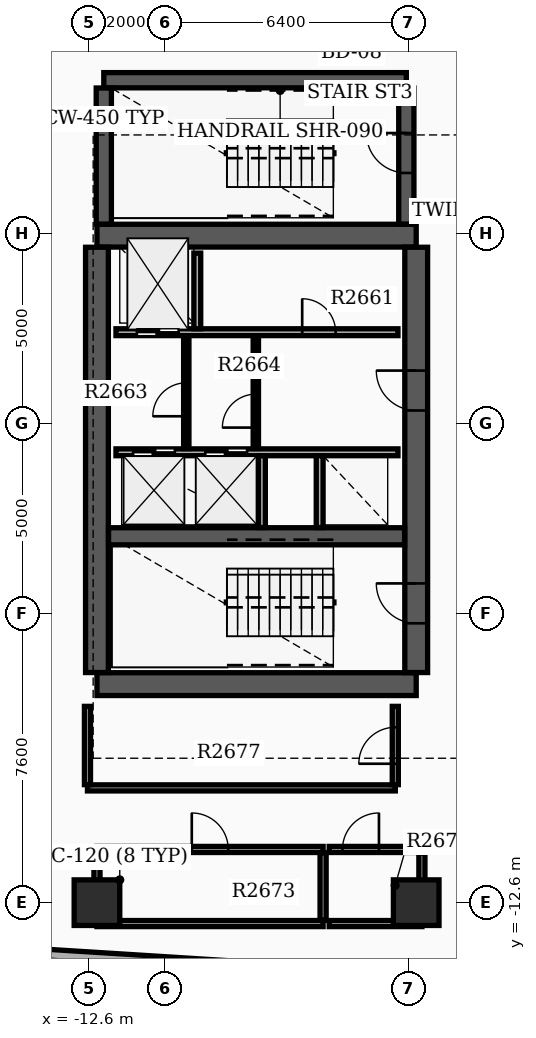
"""IFC4 building model, lengths in metres.
Left out: names, types, materials, properties, quantities, classifications, styles, units other than length and angle.
Written with IfcOpenShell. Run it as: python <this file> out.ifc"""

import sys

from ifc_helpers import new_model, si_unit, direction, frame, frame_2d, origin, origin_2d, place, context, subcontext, project, spatial, rectangle, extrude, element, fill, save


model = new_model("IFC4")
c1 = context("Model", 3, precision=1e-05, world=origin(), true_north=direction((0.0, 1.0)))
c2 = subcontext(c1, "Body", "Model", "MODEL_VIEW")
j1 = project(units=[si_unit("LENGTHUNIT", "METRE"), si_unit("PLANEANGLEUNIT", "RADIAN")], contexts=[c1])
p1 = place(None, origin())
s1 = spatial("IfcSite", under=j1, at=p1, CompositionType="ELEMENT")
p2 = place(p1, origin())
s2 = spatial("IfcBuilding", under=s1, at=p2, CompositionType="ELEMENT")
p3 = place(p2, frame((0.0, 0.0, 168.3)))
s3 = spatial("IfcBuildingStorey", under=s2, at=p3, CompositionType="ELEMENT", Elevation=168.3)
for number, where, z_axis, x_axis in (
    (1, (-12.4, -6.85, 0.0), (0.0, 0.0, 1.0), (1.0, 0.0, 0.0)),
    (2, (-12.4, 4.95, 0.0), (0.0, 0.0, 1.0), (1.0, 0.0, 0.0)),
):
    element("IfcWall", number, at=place(p3, frame(where, z_axis=z_axis, x_axis=x_axis)), inside=s3, PredefinedType="SHEAR", context=c2, shape_type="SweptSolid", body=[
        extrude(rectangle(XDim=8.4, YDim=0.6, at=frame_2d((4.2, 0.0))), origin(), (0.0, 0.0, 1.0), 3.7),
    ])
p4 = place(p3, frame((-12.4, -6.545, 0.0), z_axis=(0.0, 0.0, 1.0), x_axis=(0.0, 1.0, 0.0)))
e3 = element("IfcWall", 3, at=p4, inside=s3, PredefinedType="SHEAR", context=c2, shape_type="SweptSolid", body=[
    extrude(rectangle(XDim=11.19, YDim=0.6, at=frame_2d((5.595, 0.0))), origin(), (0.0, 0.0, 1.0), 3.7),
])
p5 = place(p3, frame((-4.0, -6.545, 0.0), z_axis=(0.0, 0.0, 1.0), x_axis=(0.0, 1.0, 0.0)))
e4 = element("IfcWall", 4, at=p5, inside=s3, PredefinedType="SHEAR", context=c2, shape_type="SweptSolid", body=[
    extrude(rectangle(XDim=11.19, YDim=0.6, at=frame_2d((5.595, 0.0))), origin(), (0.0, 0.0, 1.0), 3.7),
])
p6 = place(p5, frame((1.295, 0.0, 0.0)))
e5 = element("IfcOpeningElement", 5, at=p6, cuts=e4, PredefinedType="OPENING", context=c2, shape_type="SweptSolid", body=[
    extrude(rectangle(XDim=1.05, YDim=2.15, at=frame_2d((0.525, 1.075))), frame((0.0, 0.31, 0.0), z_axis=(0.0, -1.0, 0.0), x_axis=(1.0, 0.0, 0.0)), (0.0, 0.0, 1.0), 0.62),
])
p7 = place(p5, frame((6.895, 0.0, 0.0)))
e6 = element("IfcOpeningElement", 6, at=p7, cuts=e4, PredefinedType="OPENING", context=c2, shape_type="SweptSolid", body=[
    extrude(rectangle(XDim=1.05, YDim=2.15, at=frame_2d((0.525, 1.075))), frame((0.0, 0.31, 0.0), z_axis=(0.0, -1.0, 0.0), x_axis=(1.0, 0.0, 0.0)), (0.0, 0.0, 1.0), 0.62),
])
p8 = place(p3, frame((-12.095, -2.96, 0.0), z_axis=(0.0, 0.0, 1.0), x_axis=(1.0, 0.0, 0.0)))
e7 = element("IfcWall", 7, at=p8, inside=s3, PredefinedType="SHEAR", context=c2, shape_type="SweptSolid", body=[
    extrude(rectangle(XDim=7.79, YDim=0.45, at=frame_2d((3.895, 0.0))), origin(), (0.0, 0.0, 1.0), 3.7),
])
p9 = place(p3, frame((-12.22, 9.04, 0.0), z_axis=(0.0, 0.0, 1.0), x_axis=(1.0, 0.0, 0.0)))
e8 = element("IfcWall", 8, at=p9, inside=s3, PredefinedType="SHEAR", context=c2, shape_type="SweptSolid", body=[
    extrude(rectangle(XDim=7.96, YDim=0.4, at=frame_2d((3.98, 0.0))), origin(), (0.0, 0.0, 1.0), 3.7),
])
p10 = place(p3, frame((-12.22, 5.255, 0.0), z_axis=(0.0, 0.0, 1.0), x_axis=(0.0, 1.0, 0.0)))
e9 = element("IfcWall", 9, at=p10, inside=s3, PredefinedType="SHEAR", context=c2, shape_type="SweptSolid", body=[
    extrude(rectangle(XDim=3.58, YDim=0.4, at=frame_2d((1.79, 0.0))), origin(), (0.0, 0.0, 1.0), 3.7),
])
p11 = place(p3, frame((-4.26, 5.255, 0.0), z_axis=(0.0, 0.0, 1.0), x_axis=(0.0, 1.0, 0.0)))
e10 = element("IfcWall", 10, at=p11, inside=s3, PredefinedType="SHEAR", context=c2, shape_type="SweptSolid", body=[
    extrude(rectangle(XDim=3.58, YDim=0.4, at=frame_2d((1.79, 0.0))), origin(), (0.0, 0.0, 1.0), 3.7),
])
p12 = place(p11, frame((1.345, 0.0, 0.0)))
e11 = element("IfcOpeningElement", 11, at=p12, cuts=e10, PredefinedType="OPENING", context=c2, shape_type="SweptSolid", body=[
    extrude(rectangle(XDim=1.05, YDim=2.15, at=frame_2d((0.525, 1.075))), frame((0.0, 0.21, 0.0), z_axis=(0.0, -1.0, 0.0), x_axis=(1.0, 0.0, 0.0)), (0.0, 0.0, 1.0), 0.42),
])
for number, where, z_axis, x_axis in (
    (12, (-12.4, -12.6, 0.0), (0.0, 0.0, 1.0), (1.0, 0.0, 0.0)),
    (13, (-4.0, -12.6, 0.0), (0.0, 0.0, 1.0), (1.0, 0.0, 0.0)),
):
    element("IfcColumn", number, at=place(p3, frame(where, z_axis=z_axis, x_axis=x_axis)), inside=s3, PredefinedType="COLUMN", context=c2, shape_type="SweptSolid", body=[
        extrude(rectangle(XDim=1.2, YDim=1.2, at=origin_2d()), origin(), (0.0, 0.0, 1.0), 3.9),
    ])
p13 = place(p3, frame((-14.063, -13.945, 0.0), z_axis=(0.0, 0.0, 1.0), x_axis=(0.998027314704, -0.062781200242, 0.0)))
e14 = element("IfcWall", 14, at=p13, inside=s3, PredefinedType="STANDARD", context=c2, shape_type="SweptSolid", body=[
    extrude(rectangle(XDim=6.3, YDim=0.28, at=frame_2d((3.15, 0.0))), origin(), (0.0, 0.0, 1.0), 2.97),
])
p14 = place(p3, frame((-11.9, 2.41, 0.0), z_axis=(0.0, 0.0, 1.0), x_axis=(1.0, 0.0, 0.0)))
e15 = element("IfcWall", 15, at=p14, inside=s3, PredefinedType="SOLIDWALL", context=c2, shape_type="SweptSolid", body=[
    extrude(rectangle(XDim=7.42, YDim=0.18, at=frame_2d((3.71, 0.0))), origin(), (0.0, 0.0, 1.0), 2.96),
])
p15 = place(p14, frame((0.55, 0.0, 0.0)))
e16 = element("IfcOpeningElement", 16, at=p15, cuts=e15, PredefinedType="OPENING", context=c2, shape_type="SweptSolid", body=[
    extrude(rectangle(XDim=1.1, YDim=2.15, at=frame_2d((0.55, 1.075))), frame((0.0, 0.1, 0.0), z_axis=(0.0, -1.0, 0.0), x_axis=(1.0, 0.0, 0.0)), (0.0, 0.0, 1.0), 0.2),
])
p16 = place(p14, frame((4.9, 0.0, 0.0)))
e17 = element("IfcOpeningElement", 17, at=p16, cuts=e15, PredefinedType="OPENING", context=c2, shape_type="SweptSolid", body=[
    extrude(rectangle(XDim=0.88, YDim=2.1, at=frame_2d((0.44, 1.05))), frame((0.0, 0.1, 0.0), z_axis=(0.0, -1.0, 0.0), x_axis=(1.0, 0.0, 0.0)), (0.0, 0.0, 1.0), 0.2),
])
p17 = place(p3, frame((-11.9, -0.75, 0.0), z_axis=(0.0, 0.0, 1.0), x_axis=(1.0, 0.0, 0.0)))
e18 = element("IfcWall", 18, at=p17, inside=s3, PredefinedType="SOLIDWALL", context=c2, shape_type="SweptSolid", body=[
    extrude(rectangle(XDim=7.42, YDim=0.18, at=frame_2d((3.71, 0.0))), origin(), (0.0, 0.0, 1.0), 2.96),
])
p18 = place(p17, frame((0.45, 0.0, 0.0)))
e19 = element("IfcOpeningElement", 19, at=p18, cuts=e18, PredefinedType="OPENING", context=c2, shape_type="SweptSolid", body=[
    extrude(rectangle(XDim=1.1, YDim=2.15, at=frame_2d((0.55, 1.075))), frame((0.0, 0.1, 0.0), z_axis=(0.0, -1.0, 0.0), x_axis=(1.0, 0.0, 0.0)), (0.0, 0.0, 1.0), 0.2),
])
p19 = place(p17, frame((2.35, 0.0, 0.0)))
e20 = element("IfcOpeningElement", 20, at=p19, cuts=e18, PredefinedType="OPENING", context=c2, shape_type="SweptSolid", body=[
    extrude(rectangle(XDim=1.1, YDim=2.15, at=frame_2d((0.55, 1.075))), frame((0.0, 0.1, 0.0), z_axis=(0.0, -1.0, 0.0), x_axis=(1.0, 0.0, 0.0)), (0.0, 0.0, 1.0), 0.2),
])
p20 = place(p3, frame((-9.76, 2.5, 0.0), z_axis=(0.0, 0.0, 1.0), x_axis=(0.0, 1.0, 0.0)))
e21 = element("IfcWall", 21, at=p20, inside=s3, PredefinedType="SOLIDWALL", context=c2, shape_type="SweptSolid", body=[
    extrude(rectangle(XDim=1.99, YDim=0.18, at=frame_2d((0.995, 0.0))), origin(), (0.0, 0.0, 1.0), 2.96),
])
for number, where, z_axis, x_axis in (
    (22, (-8.06, -2.73, 0.0), (0.0, 0.0, 1.0), (0.0, 1.0, 0.0)),
    (23, (-6.54, -2.73, 0.0), (0.0, 0.0, 1.0), (0.0, 1.0, 0.0)),
):
    element("IfcWall", number, at=place(p3, frame(where, z_axis=z_axis, x_axis=x_axis)), inside=s3, PredefinedType="SOLIDWALL", context=c2, shape_type="SweptSolid", body=[
        extrude(rectangle(XDim=1.89, YDim=0.18, at=frame_2d((0.945, 0.0))), origin(), (0.0, 0.0, 1.0), 2.96),
    ])
p21 = place(p3, frame((-8.22, -0.65, 0.0), z_axis=(0.0, 0.0, 1.0), x_axis=(0.0, 1.0, 0.0)))
e24 = element("IfcWall", 24, at=p21, inside=s3, PredefinedType="SOLIDWALL", context=c2, shape_type="SweptSolid", body=[
    extrude(rectangle(XDim=2.96, YDim=0.14, at=frame_2d((1.48, 0.0))), origin(), (0.0, 0.0, 1.0), 2.96),
])
p22 = place(p21, frame((0.55, 0.0, 0.0)))
e25 = element("IfcOpeningElement", 25, at=p22, cuts=e24, PredefinedType="OPENING", context=c2, shape_type="SweptSolid", body=[
    extrude(rectangle(XDim=0.88, YDim=2.1, at=frame_2d((0.44, 1.05))), frame((0.0, 0.08, 0.0), z_axis=(0.0, -1.0, 0.0), x_axis=(1.0, 0.0, 0.0)), (0.0, 0.0, 1.0), 0.16),
])
p23 = place(p3, frame((-10.05, -0.652, 0.0), z_axis=(0.0, 0.0, 1.0), x_axis=(0.0, 1.0, 0.0)))
e26 = element("IfcWall", 26, at=p23, inside=s3, PredefinedType="PARTITIONING", context=c2, shape_type="SweptSolid", body=[
    extrude(rectangle(XDim=2.962, YDim=0.14, at=frame_2d((1.481, 0.0))), origin(), (0.0, 0.0, 1.0), 2.96),
])
p24 = place(p23, frame((0.85, 0.0, 0.0)))
e27 = element("IfcOpeningElement", 27, at=p24, cuts=e26, PredefinedType="OPENING", context=c2, shape_type="SweptSolid", body=[
    extrude(rectangle(XDim=0.88, YDim=2.1, at=frame_2d((0.44, 1.05))), frame((0.0, 0.08, 0.0), z_axis=(0.0, -1.0, 0.0), x_axis=(1.0, 0.0, 0.0)), (0.0, 0.0, 1.0), 0.16),
])
p25 = place(p3, frame((-12.4, -13.15, 0.0), z_axis=(0.0, 0.0, 1.0), x_axis=(1.0, 0.0, 0.0)))
e28 = element("IfcWall", 28, at=p25, inside=s3, PredefinedType="PARTITIONING", context=c2, shape_type="SweptSolid", body=[
    extrude(rectangle(XDim=5.95, YDim=0.16, at=frame_2d((2.975, 0.0))), origin(), (0.0, 0.0, 1.0), 2.96),
])
p26 = place(p3, frame((-12.4, -11.2, 0.0), z_axis=(0.0, 0.0, 1.0), x_axis=(1.0, 0.0, 0.0)))
e29 = element("IfcWall", 29, at=p26, inside=s3, PredefinedType="PARTITIONING", context=c2, shape_type="SweptSolid", body=[
    extrude(rectangle(XDim=5.95, YDim=0.16, at=frame_2d((2.975, 0.0))), origin(), (0.0, 0.0, 1.0), 2.96),
])
p27 = place(p26, frame((2.495, 0.0, 0.0)))
e30 = element("IfcOpeningElement", 30, at=p27, cuts=e29, PredefinedType="OPENING", context=c2, shape_type="SweptSolid", body=[
    extrude(rectangle(XDim=0.96, YDim=2.15, at=frame_2d((0.48, 1.075))), frame((0.0, 0.09, 0.0), z_axis=(0.0, -1.0, 0.0), x_axis=(1.0, 0.0, 0.0)), (0.0, 0.0, 1.0), 0.18),
])
for number, where, z_axis, x_axis in (
    (31, (-12.4, -13.065, 0.0), (0.0, 0.0, 1.0), (0.0, 1.0, 0.0)),
    (32, (-6.45, -13.065, 0.0), (0.0, 0.0, 1.0), (0.0, 1.0, 0.0)),
):
    element("IfcWall", number, at=place(p3, frame(where, z_axis=z_axis, x_axis=x_axis)), inside=s3, PredefinedType="PARTITIONING", context=c2, shape_type="SweptSolid", body=[
        extrude(rectangle(XDim=1.78, YDim=0.16, at=frame_2d((0.89, 0.0))), origin(), (0.0, 0.0, 1.0), 2.96),
    ])
p28 = place(p3, frame((-6.29, -13.15, 0.0), z_axis=(0.0, 0.0, 1.0), x_axis=(1.0, 0.0, 0.0)))
e33 = element("IfcWall", 33, at=p28, inside=s3, PredefinedType="PARTITIONING", context=c2, shape_type="SweptSolid", body=[
    extrude(rectangle(XDim=2.44, YDim=0.16, at=frame_2d((1.22, 0.0))), origin(), (0.0, 0.0, 1.0), 2.96),
])
p29 = place(p3, frame((-6.29, -11.2, 0.0), z_axis=(0.0, 0.0, 1.0), x_axis=(1.0, 0.0, 0.0)))
e34 = element("IfcWall", 34, at=p29, inside=s3, PredefinedType="PARTITIONING", context=c2, shape_type="SweptSolid", body=[
    extrude(rectangle(XDim=2.44, YDim=0.16, at=frame_2d((1.22, 0.0))), origin(), (0.0, 0.0, 1.0), 2.96),
])
p30 = place(p29, frame((0.35, 0.0, 0.0)))
e35 = element("IfcOpeningElement", 35, at=p30, cuts=e34, PredefinedType="OPENING", context=c2, shape_type="SweptSolid", body=[
    extrude(rectangle(XDim=0.96, YDim=2.15, at=frame_2d((0.48, 1.075))), frame((0.0, 0.09, 0.0), z_axis=(0.0, -1.0, 0.0), x_axis=(1.0, 0.0, 0.0)), (0.0, 0.0, 1.0), 0.18),
])
p31 = place(p3, frame((-3.85, -13.065, 0.0), z_axis=(0.0, 0.0, 1.0), x_axis=(0.0, 1.0, 0.0)))
e36 = element("IfcWall", 36, at=p31, inside=s3, PredefinedType="PARTITIONING", context=c2, shape_type="SweptSolid", body=[
    extrude(rectangle(XDim=1.78, YDim=0.16, at=frame_2d((0.89, 0.0))), origin(), (0.0, 0.0, 1.0), 2.96),
])
p32 = place(p3, frame((-12.65, -9.58, 0.0), z_axis=(0.0, 0.0, 1.0), x_axis=(1.0, 0.0, 0.0)))
e37 = element("IfcWall", 37, at=p32, inside=s3, PredefinedType="PARTITIONING", context=c2, shape_type="SweptSolid", body=[
    extrude(rectangle(XDim=8.1, YDim=0.16, at=frame_2d((4.05, 0.0))), origin(), (0.0, 0.0, 1.0), 2.96),
])
p33 = place(p3, frame((-12.65, -9.495, 0.0), z_axis=(0.0, 0.0, 1.0), x_axis=(0.0, 1.0, 0.0)))
e38 = element("IfcWall", 38, at=p33, inside=s3, PredefinedType="PARTITIONING", context=c2, shape_type="SweptSolid", body=[
    extrude(rectangle(XDim=2.06, YDim=0.16, at=frame_2d((1.03, 0.0))), origin(), (0.0, 0.0, 1.0), 2.96),
])
p34 = place(p3, frame((-4.55, -9.495, 0.0), z_axis=(0.0, 0.0, 1.0), x_axis=(0.0, 1.0, 0.0)))
e39 = element("IfcWall", 39, at=p34, inside=s3, PredefinedType="PARTITIONING", context=c2, shape_type="SweptSolid", body=[
    extrude(rectangle(XDim=2.06, YDim=0.16, at=frame_2d((1.03, 0.0))), origin(), (0.0, 0.0, 1.0), 2.96),
])
p35 = place(p34, frame((0.55, 0.0, 0.0)))
e40 = element("IfcOpeningElement", 40, at=p35, cuts=e39, PredefinedType="OPENING", context=c2, shape_type="SweptSolid", body=[
    extrude(rectangle(XDim=0.96, YDim=2.15, at=frame_2d((0.48, 1.075))), frame((0.0, 0.09, 0.0), z_axis=(0.0, -1.0, 0.0), x_axis=(1.0, 0.0, 0.0)), (0.0, 0.0, 1.0), 0.18),
])
p36 = place(p6, origin())
e41 = element("IfcDoor", 41, at=p36, inside=s3, OperationType="SINGLE_SWING_RIGHT", PredefinedType="DOOR", context=c2, shape_type="SweptSolid", body=[
    extrude(rectangle(XDim=1.05, YDim=2.15, at=frame_2d((0.525, 1.075))), frame((0.0, 0.025, 0.0), z_axis=(0.0, -1.0, 0.0), x_axis=(1.0, 0.0, 0.0)), (0.0, 0.0, 1.0), 0.05),
])
fill(e5, e41)
p37 = place(p7, origin())
e42 = element("IfcDoor", 42, at=p37, inside=s3, OperationType="SINGLE_SWING_RIGHT", PredefinedType="DOOR", context=c2, shape_type="SweptSolid", body=[
    extrude(rectangle(XDim=1.05, YDim=2.15, at=frame_2d((0.525, 1.075))), frame((0.0, 0.025, 0.0), z_axis=(0.0, -1.0, 0.0), x_axis=(1.0, 0.0, 0.0)), (0.0, 0.0, 1.0), 0.05),
])
fill(e6, e42)
p38 = place(p12, origin())
e43 = element("IfcDoor", 43, at=p38, inside=s3, OperationType="SINGLE_SWING_RIGHT", PredefinedType="DOOR", context=c2, shape_type="SweptSolid", body=[
    extrude(rectangle(XDim=1.05, YDim=2.15, at=frame_2d((0.525, 1.075))), frame((0.0, 0.025, 0.0), z_axis=(0.0, -1.0, 0.0), x_axis=(1.0, 0.0, 0.0)), (0.0, 0.0, 1.0), 0.05),
])
fill(e11, e43)
p39 = place(p15, origin())
e44 = element("IfcDoor", 44, at=p39, inside=s3, OperationType="DOUBLE_DOOR_SLIDING", PredefinedType="DOOR", context=c2, shape_type="SweptSolid", body=[
    extrude(rectangle(XDim=1.1, YDim=2.15, at=frame_2d((0.55, 1.075))), frame((0.0, 0.025, 0.0), z_axis=(0.0, -1.0, 0.0), x_axis=(1.0, 0.0, 0.0)), (0.0, 0.0, 1.0), 0.05),
])
fill(e16, e44)
p40 = place(p18, origin())
e45 = element("IfcDoor", 45, at=p40, inside=s3, OperationType="DOUBLE_DOOR_SLIDING", PredefinedType="DOOR", context=c2, shape_type="SweptSolid", body=[
    extrude(rectangle(XDim=1.1, YDim=2.15, at=frame_2d((0.55, 1.075))), frame((0.0, 0.025, 0.0), z_axis=(0.0, -1.0, 0.0), x_axis=(1.0, 0.0, 0.0)), (0.0, 0.0, 1.0), 0.05),
])
fill(e19, e45)
p41 = place(p19, origin())
e46 = element("IfcDoor", 46, at=p41, inside=s3, OperationType="DOUBLE_DOOR_SLIDING", PredefinedType="DOOR", context=c2, shape_type="SweptSolid", body=[
    extrude(rectangle(XDim=1.1, YDim=2.15, at=frame_2d((0.55, 1.075))), frame((0.0, 0.025, 0.0), z_axis=(0.0, -1.0, 0.0), x_axis=(1.0, 0.0, 0.0)), (0.0, 0.0, 1.0), 0.05),
])
fill(e20, e46)
p42 = place(p16, origin())
e47 = element("IfcDoor", 47, at=p42, inside=s3, OperationType="SINGLE_SWING_LEFT", PredefinedType="DOOR", context=c2, shape_type="SweptSolid", body=[
    extrude(rectangle(XDim=0.88, YDim=2.1, at=frame_2d((0.44, 1.05))), frame((0.0, 0.025, 0.0), z_axis=(0.0, -1.0, 0.0), x_axis=(1.0, 0.0, 0.0)), (0.0, 0.0, 1.0), 0.05),
])
fill(e17, e47)
p43 = place(p22, origin())
e48 = element("IfcDoor", 48, at=p43, inside=s3, OperationType="SINGLE_SWING_LEFT", PredefinedType="DOOR", context=c2, shape_type="SweptSolid", body=[
    extrude(rectangle(XDim=0.88, YDim=2.1, at=frame_2d((0.44, 1.05))), frame((0.0, 0.025, 0.0), z_axis=(0.0, -1.0, 0.0), x_axis=(1.0, 0.0, 0.0)), (0.0, 0.0, 1.0), 0.05),
])
fill(e25, e48)
p44 = place(p24, origin())
e49 = element("IfcDoor", 49, at=p44, inside=s3, OperationType="SINGLE_SWING_LEFT", PredefinedType="DOOR", context=c2, shape_type="SweptSolid", body=[
    extrude(rectangle(XDim=0.88, YDim=2.1, at=frame_2d((0.44, 1.05))), frame((0.0, 0.025, 0.0), z_axis=(0.0, -1.0, 0.0), x_axis=(1.0, 0.0, 0.0)), (0.0, 0.0, 1.0), 0.05),
])
fill(e27, e49)
p45 = place(p27, origin())
e50 = element("IfcDoor", 50, at=p45, inside=s3, OperationType="SINGLE_SWING_LEFT", PredefinedType="DOOR", context=c2, shape_type="SweptSolid", body=[
    extrude(rectangle(XDim=0.96, YDim=2.15, at=frame_2d((0.48, 1.075))), frame((0.0, 0.025, 0.0), z_axis=(0.0, -1.0, 0.0), x_axis=(1.0, 0.0, 0.0)), (0.0, 0.0, 1.0), 0.05),
])
fill(e30, e50)
p46 = place(p30, origin())
e51 = element("IfcDoor", 51, at=p46, inside=s3, OperationType="SINGLE_SWING_RIGHT", PredefinedType="DOOR", context=c2, shape_type="SweptSolid", body=[
    extrude(rectangle(XDim=0.96, YDim=2.15, at=frame_2d((0.48, 1.075))), frame((0.0, 0.025, 0.0), z_axis=(0.0, -1.0, 0.0), x_axis=(1.0, 0.0, 0.0)), (0.0, 0.0, 1.0), 0.05),
])
fill(e35, e51)
p47 = place(p35, origin())
e52 = element("IfcDoor", 52, at=p47, inside=s3, OperationType="SINGLE_SWING_LEFT", PredefinedType="DOOR", context=c2, shape_type="SweptSolid", body=[
    extrude(rectangle(XDim=0.96, YDim=2.15, at=frame_2d((0.48, 1.075))), frame((0.0, 0.025, 0.0), z_axis=(0.0, -1.0, 0.0), x_axis=(1.0, 0.0, 0.0)), (0.0, 0.0, 1.0), 0.05),
])
fill(e40, e52)
save(model, sys.argv[1])
